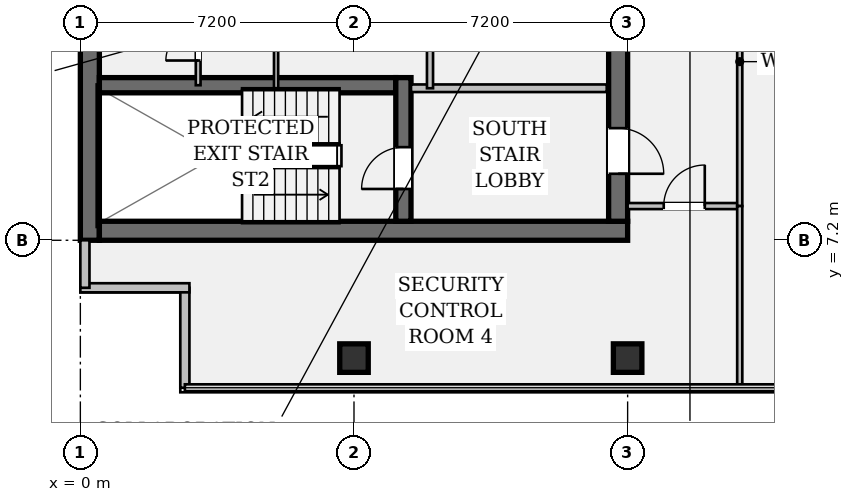
"""IFC4 building model, lengths in metres.
Left out: names, types, materials, properties, quantities, classifications, styles, units other than length and angle.
Written with IfcOpenShell. Run it as: python <this file> out.ifc"""

import sys

from ifc_helpers import new_model, si_unit, direction, frame, frame_2d, origin, origin_2d, place, context, subcontext, project, spatial, rectangle, hollow_rectangle, extrude, element, fill, save


model = new_model("IFC4")
c1 = context("Model", 3, precision=1e-05, world=origin(), true_north=direction((0.0, 1.0)))
c2 = subcontext(c1, "Body", "Model", "MODEL_VIEW")
j1 = project(units=[si_unit("LENGTHUNIT", "METRE"), si_unit("PLANEANGLEUNIT", "RADIAN")], contexts=[c1])
p1 = place(None, origin())
s1 = spatial("IfcSite", under=j1, at=p1, CompositionType="ELEMENT")
p2 = place(p1, origin())
s2 = spatial("IfcBuilding", under=s1, at=p2, CompositionType="ELEMENT")
p3 = place(p2, frame((0.0, 0.0, 208.25)))
s3 = spatial("IfcBuildingStorey", under=s2, at=p3, CompositionType="ELEMENT", Elevation=208.25)
p4 = place(p3, frame((0.25, 7.2, 0.0), z_axis=(0.0, 0.0, 1.0), x_axis=(0.0, 1.0, 0.0)))
e1 = element("IfcWall", 1, at=p4, inside=s3, PredefinedType="SHEAR", context=c2, shape_type="SweptSolid", body=[
    extrude(rectangle(XDim=28.8, YDim=0.5, at=frame_2d((14.4, 0.0))), origin(), (0.0, 0.0, 1.0), 3.24),
])
p5 = place(p3, frame((0.5, 7.45, 0.0), z_axis=(0.0, 0.0, 1.0), x_axis=(1.0, 0.0, 0.0)))
e2 = element("IfcWall", 2, at=p5, inside=s3, PredefinedType="SHEAR", context=c2, shape_type="SweptSolid", body=[
    extrude(rectangle(XDim=13.9, YDim=0.5, at=frame_2d((6.95, 0.0))), origin(), (0.0, 0.0, 1.0), 3.24),
])
p6 = place(p3, frame((14.15, 35.5, 0.0), z_axis=(0.0, 0.0, 1.0), x_axis=(0.0, -1.0, 0.0)))
e3 = element("IfcWall", 3, at=p6, inside=s3, PredefinedType="SHEAR", context=c2, shape_type="SweptSolid", body=[
    extrude(rectangle(XDim=27.8, YDim=0.5, at=frame_2d((13.9, 0.0))), origin(), (0.0, 0.0, 1.0), 3.24),
])
p7 = place(p6, frame((1.4, 0.0, 0.0)))
e4 = element("IfcOpeningElement", 4, at=p7, cuts=e3, PredefinedType="OPENING", context=c2, shape_type="SweptSolid", body=[
    extrude(rectangle(XDim=1.2, YDim=2.15, at=frame_2d((0.6, 1.075))), frame((0.0, 0.262, 0.0), z_axis=(0.0, -1.0, 0.0), x_axis=(1.0, 0.0, 0.0)), (0.0, 0.0, 1.0), 0.524),
])
p8 = place(p6, frame((25.35, 0.0, 0.0)))
e5 = element("IfcOpeningElement", 5, at=p8, cuts=e3, PredefinedType="OPENING", context=c2, shape_type="SweptSolid", body=[
    extrude(rectangle(XDim=1.2, YDim=2.15, at=frame_2d((0.6, 1.075))), frame((0.0, 0.262, 0.0), z_axis=(0.0, -1.0, 0.0), x_axis=(1.0, 0.0, 0.0)), (0.0, 0.0, 1.0), 0.524),
])
p9 = place(p6, frame((14.7, 0.0, 0.0)))
e6 = element("IfcOpeningElement", 6, at=p9, cuts=e3, PredefinedType="OPENING", context=c2, shape_type="SweptSolid", body=[
    extrude(rectangle(XDim=1.6, YDim=2.2, at=frame_2d((0.8, 1.1))), frame((0.0, 0.262, 0.0), z_axis=(0.0, -1.0, 0.0), x_axis=(1.0, 0.0, 0.0)), (0.0, 0.0, 1.0), 0.524),
])
p10 = place(p3, frame((0.5, 11.28, 0.0), z_axis=(0.0, 0.0, 1.0), x_axis=(1.0, 0.0, 0.0)))
e7 = element("IfcWall", 7, at=p10, inside=s3, PredefinedType="SHEAR", context=c2, shape_type="SweptSolid", body=[
    extrude(rectangle(XDim=7.8, YDim=0.4, at=frame_2d((3.9, 0.0))), origin(), (0.0, 0.0, 1.0), 3.24),
])
p11 = place(p3, frame((8.5, 7.7, 0.0), z_axis=(0.0, 0.0, 1.0), x_axis=(0.0, 1.0, 0.0)))
e8 = element("IfcWall", 8, at=p11, inside=s3, PredefinedType="SHEAR", context=c2, shape_type="SweptSolid", body=[
    extrude(rectangle(XDim=3.78, YDim=0.4, at=frame_2d((1.89, 0.0))), origin(), (0.0, 0.0, 1.0), 3.24),
])
p12 = place(p11, frame((0.85, 0.0, 0.0)))
e9 = element("IfcOpeningElement", 9, at=p12, cuts=e8, PredefinedType="OPENING", context=c2, shape_type="SweptSolid", body=[
    extrude(rectangle(XDim=1.1, YDim=2.15, at=frame_2d((0.55, 1.075))), frame((0.0, 0.212, 0.0), z_axis=(0.0, -1.0, 0.0), x_axis=(1.0, 0.0, 0.0)), (0.0, 0.0, 1.0), 0.424),
])
for number, where, z_axis, x_axis in (
    (10, (7.2, 4.1, 0.0), (0.0, 0.0, 1.0), (1.0, 0.0, 0.0)),
    (11, (14.4, 4.1, 0.0), (0.0, 0.0, 1.0), (1.0, 0.0, 0.0)),
):
    element("IfcColumn", number, at=place(p3, frame(where, z_axis=z_axis, x_axis=x_axis)), inside=s3, PredefinedType="COLUMN", context=c2, shape_type="SweptSolid", body=[
        extrude(hollow_rectangle(XDim=0.75, YDim=0.75, WallThickness=0.045, at=origin_2d()), origin(), (0.0, 0.0, 1.0), 3.24),
    ])
p13 = place(p3, frame((2.75, 3.32, 0.0), z_axis=(0.0, 0.0, 1.0), x_axis=(0.0, 1.0, 0.0)))
e12 = element("IfcWall", 12, at=p13, inside=s3, PredefinedType="STANDARD", context=c2, shape_type="SweptSolid", body=[
    extrude(rectangle(XDim=2.63, YDim=0.24, at=frame_2d((1.315, 0.0))), origin(), (0.0, 0.0, 1.0), 3.24),
])
p14 = place(p3, frame((2.87, 5.95, 0.0), z_axis=(0.0, 0.0, 1.0), x_axis=(-1.0, 0.0, 0.0)))
e13 = element("IfcWall", 13, at=p14, inside=s3, PredefinedType="STANDARD", context=c2, shape_type="SweptSolid", body=[
    extrude(rectangle(XDim=2.87, YDim=0.24, at=frame_2d((1.435, 0.0))), origin(), (0.0, 0.0, 1.0), 3.24),
])
p15 = place(p3, frame((0.12, 5.95, 0.0), z_axis=(0.0, 0.0, 1.0), x_axis=(0.0, 1.0, 0.0)))
e14 = element("IfcWall", 14, at=p15, inside=s3, PredefinedType="STANDARD", context=c2, shape_type="SweptSolid", body=[
    extrude(rectangle(XDim=1.25, YDim=0.24, at=frame_2d((0.625, 0.0))), origin(), (0.0, 0.0, 1.0), 3.24),
])
p16 = place(p3, frame((8.7, 11.2, 0.0), z_axis=(0.0, 0.0, 1.0), x_axis=(1.0, 0.0, 0.0)))
e15 = element("IfcWall", 15, at=p16, inside=s3, PredefinedType="PARTITIONING", context=c2, shape_type="SweptSolid", body=[
    extrude(rectangle(XDim=5.15, YDim=0.2, at=frame_2d((2.575, 0.0))), origin(), (0.0, 0.0, 1.0), 3.24),
])
p17 = place(p3, frame((5.15, 11.2, 0.0), z_axis=(0.0, 0.0, 1.0), x_axis=(0.0, 1.0, 0.0)))
e16 = element("IfcWall", 16, at=p17, inside=s3, PredefinedType="PARTITIONING", context=c2, shape_type="SweptSolid", body=[
    extrude(rectangle(XDim=6.6, YDim=0.11, at=frame_2d((3.3, 0.0))), origin(), (0.0, 0.0, 1.0), 3.24),
])
p18 = place(p3, frame((9.2, 11.2, 0.0), z_axis=(0.0, 0.0, 1.0), x_axis=(0.0, 1.0, 0.0)))
e17 = element("IfcWall", 17, at=p18, inside=s3, PredefinedType="PARTITIONING", context=c2, shape_type="SweptSolid", body=[
    extrude(rectangle(XDim=6.6, YDim=0.16, at=frame_2d((3.3, 0.0))), origin(), (0.0, 0.0, 1.0), 3.24),
])
p19 = place(p3, frame((3.1, 11.28, 0.0), z_axis=(0.0, 0.0, 1.0), x_axis=(0.0, 1.0, 0.0)))
e18 = element("IfcWall", 18, at=p19, inside=s3, PredefinedType="PARTITIONING", context=c2, shape_type="SweptSolid", body=[
    extrude(rectangle(XDim=4.42, YDim=0.125, at=frame_2d((2.21, 0.0))), origin(), (0.0, 0.0, 1.0), 3.24),
])
p20 = place(p19, frame((0.65, 0.0, 0.0)))
e19 = element("IfcOpeningElement", 19, at=p20, cuts=e18, PredefinedType="OPENING", context=c2, shape_type="SweptSolid", body=[
    extrude(rectangle(XDim=0.85, YDim=2.15, at=frame_2d((0.425, 1.075))), frame((0.0, 0.074, 0.0), z_axis=(0.0, -1.0, 0.0), x_axis=(1.0, 0.0, 0.0)), (0.0, 0.0, 1.0), 0.149),
])
p21 = place(p19, frame((2.75, 0.0, 0.0)))
e20 = element("IfcOpeningElement", 20, at=p21, cuts=e18, PredefinedType="OPENING", context=c2, shape_type="SweptSolid", body=[
    extrude(rectangle(XDim=0.85, YDim=2.15, at=frame_2d((0.425, 1.075))), frame((0.0, 0.074, 0.0), z_axis=(0.0, -1.0, 0.0), x_axis=(1.0, 0.0, 0.0)), (0.0, 0.0, 1.0), 0.149),
])
p22 = place(p3, frame((14.4, 8.1, 0.0), z_axis=(0.0, 0.0, 1.0), x_axis=(1.0, 0.0, 0.0)))
e21 = element("IfcWall", 21, at=p22, inside=s3, PredefinedType="PARTITIONING", context=c2, shape_type="SweptSolid", body=[
    extrude(rectangle(XDim=2.95, YDim=0.16, at=frame_2d((1.475, 0.0))), origin(), (0.0, 0.0, 1.0), 2.808),
])
p23 = place(p22, frame((0.95, 0.0, 0.0)))
e22 = element("IfcOpeningElement", 22, at=p23, cuts=e21, PredefinedType="OPENING", context=c2, shape_type="SweptSolid", body=[
    extrude(rectangle(XDim=1.08, YDim=2.15, at=frame_2d((0.54, 1.075))), frame((0.0, 0.092, 0.0), z_axis=(0.0, -1.0, 0.0), x_axis=(1.0, 0.0, 0.0)), (0.0, 0.0, 1.0), 0.184),
])
p24 = place(p3, frame((17.35, 8.1, 0.0), z_axis=(0.0, 0.0, 1.0), x_axis=(0.0, 1.0, 0.0)))
e23 = element("IfcWall", 23, at=p24, inside=s3, PredefinedType="PARTITIONING", context=c2, shape_type="SweptSolid", body=[
    extrude(rectangle(XDim=7.6, YDim=0.135, at=frame_2d((3.8, 0.0))), origin(), (0.0, 0.0, 1.0), 2.613),
])
p25 = place(p3, frame((17.35, 3.32, 0.0), z_axis=(0.0, 0.0, 1.0), x_axis=(0.0, 1.0, 0.0)))
e24 = element("IfcWall", 24, at=p25, inside=s3, PredefinedType="PARTITIONING", context=c2, shape_type="SweptSolid", body=[
    extrude(rectangle(XDim=4.78, YDim=0.135, at=frame_2d((2.39, 0.0))), origin(), (0.0, 0.0, 1.0), 2.613),
])
p26 = place(p12, origin())
e25 = element("IfcDoor", 25, at=p26, inside=s3, OperationType="SINGLE_SWING_LEFT", PredefinedType="DOOR", context=c2, shape_type="SweptSolid", body=[
    extrude(rectangle(XDim=1.1, YDim=2.15, at=frame_2d((0.55, 1.075))), frame((0.0, 0.025, 0.0), z_axis=(0.0, -1.0, 0.0), x_axis=(1.0, 0.0, 0.0)), (0.0, 0.0, 1.0), 0.05),
])
fill(e9, e25)
p27 = place(p8, origin())
e26 = element("IfcDoor", 26, at=p27, inside=s3, OperationType="SINGLE_SWING_RIGHT", PredefinedType="DOOR", context=c2, shape_type="SweptSolid", body=[
    extrude(rectangle(XDim=1.2, YDim=2.15, at=frame_2d((0.6, 1.075))), frame((0.0, 0.025, 0.0), z_axis=(0.0, -1.0, 0.0), x_axis=(1.0, 0.0, 0.0)), (0.0, 0.0, 1.0), 0.05),
])
fill(e5, e26)
p28 = place(p20, origin())
e27 = element("IfcDoor", 27, at=p28, inside=s3, OperationType="SINGLE_SWING_LEFT", PredefinedType="DOOR", context=c2, shape_type="SweptSolid", body=[
    extrude(rectangle(XDim=0.85, YDim=2.15, at=frame_2d((0.425, 1.075))), frame((0.0, 0.025, 0.0), z_axis=(0.0, -1.0, 0.0), x_axis=(1.0, 0.0, 0.0)), (0.0, 0.0, 1.0), 0.05),
])
fill(e19, e27)
p29 = place(p23, origin())
e28 = element("IfcDoor", 28, at=p29, inside=s3, OperationType="SINGLE_SWING_RIGHT", PredefinedType="DOOR", context=c2, shape_type="SweptSolid", body=[
    extrude(rectangle(XDim=1.08, YDim=2.15, at=frame_2d((0.54, 1.075))), frame((0.0, 0.025, 0.0), z_axis=(0.0, -1.0, 0.0), x_axis=(1.0, 0.0, 0.0)), (0.0, 0.0, 1.0), 0.05),
])
fill(e22, e28)
save(model, sys.argv[1])
